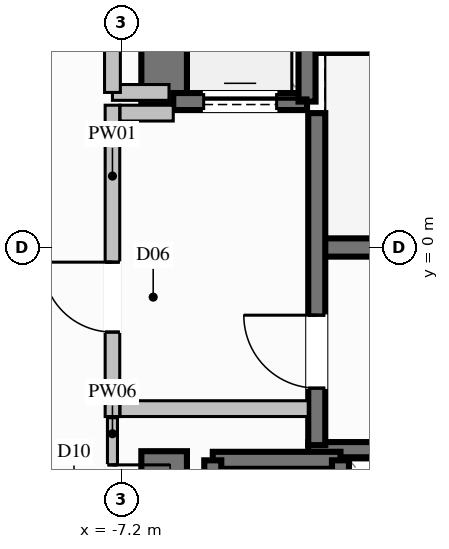
"""IFC4 building model, lengths in metres.
Left out: names, types, materials, properties, quantities, classifications, styles, units other than length and angle.
Written with IfcOpenShell. Run it as: python <this file> out.ifc"""

import sys

from ifc_helpers import new_model, si_unit, direction, frame, frame_2d, origin, place, context, subcontext, project, spatial, rectangle, extrude, element, fill, save


model = new_model("IFC4")
c1 = context("Model", 3, precision=1e-05, world=origin(), true_north=direction((0.0, 1.0)))
c2 = subcontext(c1, "Body", "Model", "MODEL_VIEW")
j1 = project(units=[si_unit("LENGTHUNIT", "METRE"), si_unit("PLANEANGLEUNIT", "RADIAN")], contexts=[c1])
p1 = place(None, origin())
s1 = spatial("IfcSite", under=j1, at=p1, CompositionType="ELEMENT")
p2 = place(p1, origin())
s2 = spatial("IfcBuilding", under=s1, at=p2, CompositionType="ELEMENT")
p3 = place(p2, frame((0.0, 0.0, 35.6)))
s3 = spatial("IfcBuildingStorey", under=s2, at=p3, CompositionType="ELEMENT", Elevation=35.6)
p4 = place(p3, frame((-3.99, 0.0, 0.0), z_axis=(0.0, 0.0, 1.0), x_axis=(1.0, 0.0, 0.0)))
e1 = element("IfcWall", 1, at=p4, inside=s3, PredefinedType="SHEAR", context=c2, shape_type="SweptSolid", body=[
    extrude(rectangle(XDim=7.98, YDim=0.3, at=frame_2d((3.99, 0.0))), origin(), (0.0, 0.0, 1.0), 3.6),
])
for number, where, z_axis, x_axis in (
    (2, (-4.13, -3.325, 0.0), (0.0, 0.0, 1.0), (1.0, 0.0, 0.0)),
    (3, (-4.13, 3.325, 0.0), (0.0, 0.0, 1.0), (1.0, 0.0, 0.0)),
):
    element("IfcWall", number, at=place(p3, frame(where, z_axis=z_axis, x_axis=x_axis)), inside=s3, PredefinedType="SOLIDWALL", context=c2, shape_type="SweptSolid", body=[
        extrude(rectangle(XDim=8.26, YDim=0.25, at=frame_2d((4.13, 0.0))), origin(), (0.0, 0.0, 1.0), 3.6),
    ])
p5 = place(p3, frame((-6.5, 2.35, 0.0), z_axis=(0.0, 0.0, 1.0), x_axis=(0.0, 1.0, 0.0)))
e4 = element("IfcWall", 4, at=p5, inside=s3, PredefinedType="SHEAR", context=c2, shape_type="SweptSolid", body=[
    extrude(rectangle(XDim=4.125, YDim=0.75, at=frame_2d((2.062, 0.0))), origin(), (0.0, 0.0, 1.0), 3.6),
])
p6 = place(p3, frame((-6.5, -6.475, 0.0), z_axis=(0.0, 0.0, 1.0), x_axis=(0.0, 1.0, 0.0)))
e5 = element("IfcWall", 5, at=p6, inside=s3, PredefinedType="SHEAR", context=c2, shape_type="SweptSolid", body=[
    extrude(rectangle(XDim=3.125, YDim=0.75, at=frame_2d((1.562, 0.0))), origin(), (0.0, 0.0, 1.0), 3.6),
])
p7 = place(p3, frame((-3.6, -3.5, 0.0), z_axis=(0.0, 0.0, 1.0), x_axis=(-1.0, 0.0, 0.0)))
e6 = element("IfcWall", 6, at=p7, inside=s3, PredefinedType="SOLIDWALL", context=c2, shape_type="SweptSolid", body=[
    extrude(rectangle(XDim=2.1, YDim=0.28, at=frame_2d((1.05, 0.0))), origin(), (0.0, 0.0, 1.0), 3.34),
])
for number, where, z_axis, x_axis in (
    (7, (-5.7, -3.5, 0.0), (0.0, 0.0, 1.0), (0.0, -1.0, 0.0)),
    (8, (-3.6, -6.0, 0.0), (0.0, 0.0, 1.0), (0.0, 1.0, 0.0)),
):
    element("IfcWall", number, at=place(p3, frame(where, z_axis=z_axis, x_axis=x_axis)), inside=s3, PredefinedType="SOLIDWALL", context=c2, shape_type="SweptSolid", body=[
        extrude(rectangle(XDim=2.5, YDim=0.28, at=frame_2d((1.25, 0.0))), origin(), (0.0, 0.0, 1.0), 3.34),
    ])
p8 = place(p3, frame((-6.35, 2.4, 0.0), z_axis=(0.0, 0.0, 1.0), x_axis=(1.0, 0.0, 0.0)))
e9 = element("IfcWall", 9, at=p8, inside=s3, PredefinedType="SOLIDWALL", context=c2, shape_type="SweptSolid", body=[
    extrude(rectangle(XDim=2.2, YDim=0.28, at=frame_2d((1.1, 0.0))), origin(), (0.0, 0.0, 1.0), 3.34),
])
p9 = place(p8, frame((0.5, 0.0, 0.0)))
e10 = element("IfcOpeningElement", 10, at=p9, cuts=e9, PredefinedType="OPENING", context=c2, shape_type="SweptSolid", body=[
    extrude(rectangle(XDim=1.2, YDim=2.2, at=frame_2d((0.6, 1.1))), frame((0.0, 0.15, 0.0), z_axis=(0.0, -1.0, 0.0), x_axis=(1.0, 0.0, 0.0)), (0.0, 0.0, 1.0), 0.3),
])
p10 = place(p3, frame((-4.15, 2.4, 0.0), z_axis=(0.0, 0.0, 1.0), x_axis=(0.0, 1.0, 0.0)))
e11 = element("IfcWall", 11, at=p10, inside=s3, PredefinedType="SOLIDWALL", context=c2, shape_type="SweptSolid", body=[
    extrude(rectangle(XDim=2.7, YDim=0.28, at=frame_2d((1.35, 0.0))), origin(), (0.0, 0.0, 1.0), 3.34),
])
p11 = place(p3, frame((-3.99, -3.25, 0.0), z_axis=(0.0, 0.0, 1.0), x_axis=(0.0, 1.0, 0.0)))
e12 = element("IfcWall", 12, at=p11, inside=s3, PredefinedType="SOLIDWALL", context=c2, shape_type="SweptSolid", body=[
    extrude(rectangle(XDim=5.46, YDim=0.28, at=frame_2d((2.73, 0.0))), origin(), (0.0, 0.0, 1.0), 3.34),
])
p12 = place(p11, frame((0.937, 0.0, 0.0)))
e13 = element("IfcOpeningElement", 13, at=p12, cuts=e12, PredefinedType="OPENING", context=c2, shape_type="SweptSolid", body=[
    extrude(rectangle(XDim=1.2, YDim=2.2, at=frame_2d((0.6, 1.1))), frame((0.0, 0.15, 0.0), z_axis=(0.0, -1.0, 0.0), x_axis=(1.0, 0.0, 0.0)), (0.0, 0.0, 1.0), 0.3),
])
p13 = place(p3, frame((-7.35, -2.78, 0.0), z_axis=(0.0, 0.0, 1.0), x_axis=(0.0, 1.0, 0.0)))
e14 = element("IfcWall", 14, at=p13, inside=s3, PredefinedType="PARTITIONING", context=c2, shape_type="SweptSolid", body=[
    extrude(rectangle(XDim=5.12, YDim=0.24, at=frame_2d((2.56, 0.0))), origin(), (0.0, 0.0, 1.0), 2.425),
])
p14 = place(p13, frame((1.389, 0.0, 0.0)))
e15 = element("IfcOpeningElement", 15, at=p14, cuts=e14, PredefinedType="OPENING", context=c2, shape_type="SweptSolid", body=[
    extrude(rectangle(XDim=1.15, YDim=2.2, at=frame_2d((0.575, 1.1))), frame((0.0, 0.13, 0.0), z_axis=(0.0, -1.0, 0.0), x_axis=(1.0, 0.0, 0.0)), (0.0, 0.0, 1.0), 0.26),
])
p15 = place(p3, frame((-7.225, -2.65, 0.0), z_axis=(0.0, 0.0, 1.0), x_axis=(1.0, 0.0, 0.0)))
e16 = element("IfcWall", 16, at=p15, inside=s3, PredefinedType="PARTITIONING", context=c2, shape_type="SweptSolid", body=[
    extrude(rectangle(XDim=3.095, YDim=0.26, at=frame_2d((1.548, 0.0))), origin(), (0.0, 0.0, 1.0), 3.34),
])
p16 = place(p3, frame((-7.225, 2.21, 0.0), z_axis=(0.0, 0.0, 1.0), x_axis=(1.0, 0.0, 0.0)))
e17 = element("IfcWall", 17, at=p16, inside=s3, PredefinedType="PARTITIONING", context=c2, shape_type="SweptSolid", body=[
    extrude(rectangle(XDim=0.875, YDim=0.26, at=frame_2d((0.438, 0.0))), origin(), (0.0, 0.0, 1.0), 3.34),
])
p17 = place(p3, frame((-7.35, 2.55, 0.0), z_axis=(0.0, 0.0, 1.0), x_axis=(1.0, 0.0, 0.0)))
e18 = element("IfcWall", 18, at=p17, inside=s3, PredefinedType="PARTITIONING", context=c2, shape_type="SweptSolid", body=[
    extrude(rectangle(XDim=0.93, YDim=0.26, at=frame_2d((0.465, 0.0))), origin(), (0.0, 0.0, 1.0), 3.34),
])
p18 = place(p3, frame((-7.35, 2.55, 0.0), z_axis=(0.0, 0.0, 1.0), x_axis=(0.0, 1.0, 0.0)))
e19 = element("IfcWall", 19, at=p18, inside=s3, PredefinedType="PARTITIONING", context=c2, shape_type="SweptSolid", body=[
    extrude(rectangle(XDim=2.4, YDim=0.26, at=frame_2d((1.2, 0.0))), origin(), (0.0, 0.0, 1.0), 2.425),
])
p19 = place(p18, frame((0.775, 0.0, 0.0)))
e20 = element("IfcOpeningElement", 20, at=p19, cuts=e19, PredefinedType="OPENING", context=c2, shape_type="SweptSolid", body=[
    extrude(rectangle(XDim=0.85, YDim=2.05, at=frame_2d((0.425, 1.025))), frame((0.0, 0.14, 0.0), z_axis=(0.0, -1.0, 0.0), x_axis=(1.0, 0.0, 0.0)), (0.0, 0.0, 1.0), 0.28),
])
p20 = place(p3, frame((-7.35, -2.8, 0.0), z_axis=(0.0, 0.0, 1.0), x_axis=(0.0, -1.0, 0.0)))
e21 = element("IfcWall", 21, at=p20, inside=s3, PredefinedType="PARTITIONING", context=c2, shape_type="SweptSolid", body=[
    extrude(rectangle(XDim=2.5, YDim=0.165, at=frame_2d((1.25, 0.0))), origin(), (0.0, 0.0, 1.0), 3.34),
])
p21 = place(p20, frame((0.775, 0.0, 0.0)))
e22 = element("IfcOpeningElement", 22, at=p21, cuts=e21, PredefinedType="OPENING", context=c2, shape_type="SweptSolid", body=[
    extrude(rectangle(XDim=0.95, YDim=2.1, at=frame_2d((0.475, 1.05))), frame((0.0, 0.093, 0.0), z_axis=(0.0, -1.0, 0.0), x_axis=(1.0, 0.0, 0.0)), (0.0, 0.0, 1.0), 0.185),
])
p22 = place(p9, origin())
e23 = element("IfcDoor", 23, at=p22, inside=s3, OperationType="SLIDING_TO_LEFT", PredefinedType="DOOR", context=c2, shape_type="SweptSolid", body=[
    extrude(rectangle(XDim=1.2, YDim=2.2, at=frame_2d((0.6, 1.1))), frame((0.0, 0.025, 0.0), z_axis=(0.0, -1.0, 0.0), x_axis=(1.0, 0.0, 0.0)), (0.0, 0.0, 1.0), 0.05),
])
fill(e10, e23)
p23 = place(p12, origin())
e24 = element("IfcDoor", 24, at=p23, inside=s3, OperationType="SINGLE_SWING_RIGHT", PredefinedType="DOOR", context=c2, shape_type="SweptSolid", body=[
    extrude(rectangle(XDim=1.2, YDim=2.2, at=frame_2d((0.6, 1.1))), frame((0.0, 0.025, 0.0), z_axis=(0.0, -1.0, 0.0), x_axis=(1.0, 0.0, 0.0)), (0.0, 0.0, 1.0), 0.05),
])
fill(e13, e24)
p24 = place(p14, origin())
e25 = element("IfcDoor", 25, at=p24, inside=s3, OperationType="SINGLE_SWING_RIGHT", PredefinedType="DOOR", context=c2, shape_type="SweptSolid", body=[
    extrude(rectangle(XDim=1.15, YDim=2.2, at=frame_2d((0.575, 1.1))), frame((0.0, 0.025, 0.0), z_axis=(0.0, -1.0, 0.0), x_axis=(1.0, 0.0, 0.0)), (0.0, 0.0, 1.0), 0.05),
])
fill(e15, e25)
p25 = place(p21, origin())
e26 = element("IfcDoor", 26, at=p25, inside=s3, OperationType="SINGLE_SWING_LEFT", PredefinedType="DOOR", context=c2, shape_type="SweptSolid", body=[
    extrude(rectangle(XDim=0.95, YDim=2.1, at=frame_2d((0.475, 1.05))), frame((0.0, 0.025, 0.0), z_axis=(0.0, -1.0, 0.0), x_axis=(1.0, 0.0, 0.0)), (0.0, 0.0, 1.0), 0.05),
])
fill(e22, e26)
save(model, sys.argv[1])
